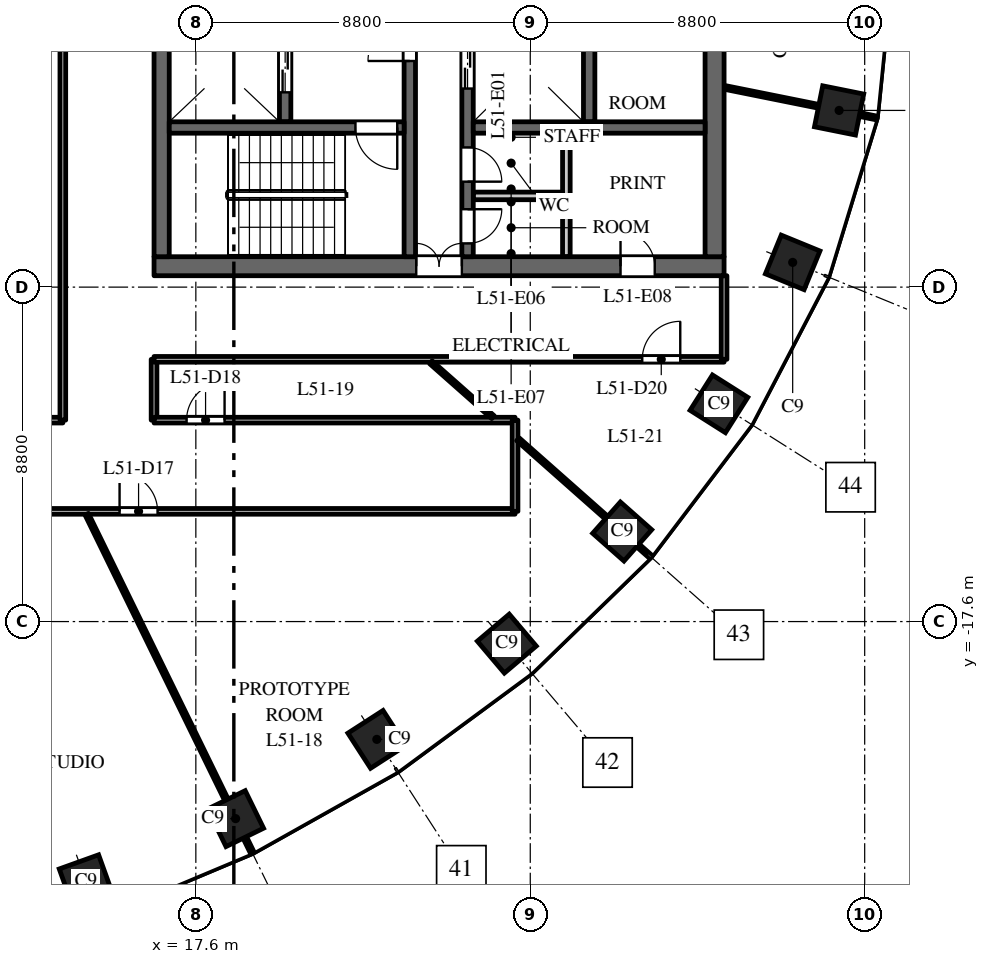
"""IFC4 building model, lengths in metres.
Left out: names, types, materials, properties, quantities, classifications, styles, units other than length and angle.
Written with IfcOpenShell. Run it as: python <this file> out.ifc"""

import sys

from ifc_helpers import new_model, si_unit, direction, frame, frame_2d, origin, origin_2d, place, context, subcontext, project, spatial, rectangle, extrude, element, fill, save


model = new_model("IFC4")
c1 = context("Model", 3, precision=1e-05, world=origin(), true_north=direction((0.0, 1.0)))
c2 = subcontext(c1, "Body", "Model", "MODEL_VIEW")
j1 = project(units=[si_unit("LENGTHUNIT", "METRE"), si_unit("PLANEANGLEUNIT", "RADIAN")], contexts=[c1])
p1 = place(None, origin())
s1 = spatial("IfcSite", under=j1, at=p1, CompositionType="ELEMENT")
p2 = place(p1, origin())
s2 = spatial("IfcBuilding", under=s1, at=p2, CompositionType="ELEMENT")
p3 = place(p2, frame((0.0, 0.0, 245.5)))
s3 = spatial("IfcBuildingStorey", under=s2, at=p3, CompositionType="ELEMENT", Elevation=245.5)
for number, where, z_axis, x_axis in (
    (1, (14.709, -24.441, 0.0), (0.0, 0.0, 1.0), (0.941, 0.338, 0.0)),
    (2, (18.646, -22.785, 0.0), (0.0, 0.0, 1.0), (0.898, 0.439, 0.0)),
    (3, (22.362, -20.7, 0.0), (0.0, 0.0, 1.0), (0.84, 0.542, 0.0)),
    (4, (25.783, -18.18, 0.0), (0.0, 0.0, 1.0), (0.763, 0.646, 0.0)),
    (5, (28.819, -15.23, 0.0), (0.0, 0.0, 1.0), (0.663, 0.749, 0.0)),
    (6, (31.365, -11.871, 0.0), (0.0, 0.0, 1.0), (0.535, 0.845, 0.0)),
    (7, (33.305, -8.149, 0.0), (0.0, 0.0, 1.0), (0.379, 0.925, 0.0)),
    (8, (34.527, -4.151, 0.0), (0.0, 0.0, 1.0), (0.197, 0.98, 0.0)),
):
    element("IfcColumn", number, at=place(p3, frame(where, z_axis=z_axis, x_axis=x_axis)), inside=s3, PredefinedType="COLUMN", context=c2, shape_type="SweptSolid", body=[
        extrude(rectangle(XDim=1.1, YDim=1.1, at=origin_2d()), origin(), (0.0, 0.0, 1.0), 4.0),
    ])
p4 = place(p3, frame((16.5, -8.25, 0.0), z_axis=(0.0, 0.0, 1.0), x_axis=(1.0, 0.0, 0.0)))
e9 = element("IfcWall", 9, at=p4, inside=s3, PredefinedType="SHEAR", context=c2, shape_type="SweptSolid", body=[
    extrude(rectangle(XDim=15.0, YDim=0.5, at=frame_2d((7.5, 0.0))), origin(), (0.0, 0.0, 1.0), 3.7),
])
p5 = place(p4, frame((6.9, 0.0, 0.0)))
e10 = element("IfcOpeningElement", 10, at=p5, cuts=e9, PredefinedType="OPENING", context=c2, shape_type="SweptSolid", body=[
    extrude(rectangle(XDim=1.2, YDim=2.1, at=frame_2d((0.6, 1.05))), frame((0.0, 0.26, 0.0), z_axis=(0.0, -1.0, 0.0), x_axis=(1.0, 0.0, 0.0)), (0.0, 0.0, 1.0), 0.52),
])
p6 = place(p4, frame((12.275, 0.0, 0.0)))
e11 = element("IfcOpeningElement", 11, at=p6, cuts=e9, PredefinedType="OPENING", context=c2, shape_type="SweptSolid", body=[
    extrude(rectangle(XDim=0.9, YDim=2.1, at=frame_2d((0.45, 1.05))), frame((0.0, 0.26, 0.0), z_axis=(0.0, -1.0, 0.0), x_axis=(1.0, 0.0, 0.0)), (0.0, 0.0, 1.0), 0.52),
])
p7 = place(p3, frame((27.95, -4.45, 0.0), z_axis=(0.0, 0.0, 1.0), x_axis=(0.0, 1.0, 0.0)))
e12 = element("IfcWall", 12, at=p7, inside=s3, PredefinedType="SHEAR", context=c2, shape_type="SweptSolid", body=[
    extrude(rectangle(XDim=8.9, YDim=0.3, at=frame_2d((4.45, 0.0))), origin(), (0.0, 0.0, 1.0), 3.7),
])
p8 = place(p3, frame((19.95, -4.45, 0.0), z_axis=(0.0, 0.0, 1.0), x_axis=(0.0, 1.0, 0.0)))
e13 = element("IfcWall", 13, at=p8, inside=s3, PredefinedType="SHEAR", context=c2, shape_type="SweptSolid", body=[
    extrude(rectangle(XDim=8.9, YDim=0.3, at=frame_2d((4.45, 0.0))), origin(), (0.0, 0.0, 1.0), 3.7),
])
p9 = place(p8, frame((0.775, 0.0, 0.0)))
e14 = element("IfcOpeningElement", 14, at=p9, cuts=e13, PredefinedType="OPENING", context=c2, shape_type="SweptSolid", body=[
    extrude(rectangle(XDim=1.2, YDim=2.1, at=frame_2d((0.6, 1.05))), frame((0.0, 0.16, 0.0), z_axis=(0.0, -1.0, 0.0), x_axis=(1.0, 0.0, 0.0)), (0.0, 0.0, 1.0), 0.32),
])
p10 = place(p8, frame((4.675, 0.0, 0.0)))
e15 = element("IfcOpeningElement", 15, at=p10, cuts=e13, PredefinedType="OPENING", context=c2, shape_type="SweptSolid", body=[
    extrude(rectangle(XDim=1.1, YDim=2.1, at=frame_2d((0.55, 1.05))), frame((0.0, 0.16, 0.0), z_axis=(0.0, -1.0, 0.0), x_axis=(1.0, 0.0, 0.0)), (0.0, 0.0, 1.0), 0.32),
])
p11 = place(p8, frame((7.25, 0.0, 0.0)))
e16 = element("IfcOpeningElement", 16, at=p11, cuts=e13, PredefinedType="OPENING", context=c2, shape_type="SweptSolid", body=[
    extrude(rectangle(XDim=1.1, YDim=2.1, at=frame_2d((0.55, 1.05))), frame((0.0, 0.16, 0.0), z_axis=(0.0, -1.0, 0.0), x_axis=(1.0, 0.0, 0.0)), (0.0, 0.0, 1.0), 0.32),
])
p12 = place(p3, frame((24.75, -8.0, 0.0), z_axis=(0.0, 0.0, 1.0), x_axis=(0.0, 1.0, 0.0)))
e17 = element("IfcWall", 17, at=p12, inside=s3, PredefinedType="SHEAR", context=c2, shape_type="SweptSolid", body=[
    extrude(rectangle(XDim=16.0, YDim=0.3, at=frame_2d((8.0, 0.0))), origin(), (0.0, 0.0, 1.0), 3.7),
])
p13 = place(p12, frame((4.425, 0.0, 0.0)))
e18 = element("IfcOpeningElement", 18, at=p13, cuts=e17, PredefinedType="OPENING", context=c2, shape_type="SweptSolid", body=[
    extrude(rectangle(XDim=1.1, YDim=2.1, at=frame_2d((0.55, 1.05))), frame((0.0, 0.16, 0.0), z_axis=(0.0, -1.0, 0.0), x_axis=(1.0, 0.0, 0.0)), (0.0, 0.0, 1.0), 0.32),
])
p14 = place(p12, frame((7.45, 0.0, 0.0)))
e19 = element("IfcOpeningElement", 19, at=p14, cuts=e17, PredefinedType="OPENING", context=c2, shape_type="SweptSolid", body=[
    extrude(rectangle(XDim=1.1, YDim=2.1, at=frame_2d((0.55, 1.05))), frame((0.0, 0.16, 0.0), z_axis=(0.0, -1.0, 0.0), x_axis=(1.0, 0.0, 0.0)), (0.0, 0.0, 1.0), 0.32),
])
p15 = place(p12, frame((10.475, 0.0, 0.0)))
e20 = element("IfcOpeningElement", 20, at=p15, cuts=e17, PredefinedType="OPENING", context=c2, shape_type="SweptSolid", body=[
    extrude(rectangle(XDim=1.1, YDim=2.1, at=frame_2d((0.55, 1.05))), frame((0.0, 0.16, 0.0), z_axis=(0.0, -1.0, 0.0), x_axis=(1.0, 0.0, 0.0)), (0.0, 0.0, 1.0), 0.32),
])
p16 = place(p12, frame((13.75, 0.0, 0.0)))
e21 = element("IfcOpeningElement", 21, at=p16, cuts=e17, PredefinedType="OPENING", context=c2, shape_type="SweptSolid", body=[
    extrude(rectangle(XDim=0.9, YDim=2.1, at=frame_2d((0.45, 1.05))), frame((0.0, 0.16, 0.0), z_axis=(0.0, -1.0, 0.0), x_axis=(1.0, 0.0, 0.0)), (0.0, 0.0, 1.0), 0.32),
])
p17 = place(p12, frame((1.975, 0.0, 0.0)))
e22 = element("IfcOpeningElement", 22, at=p17, cuts=e17, PredefinedType="OPENING", context=c2, shape_type="SweptSolid", body=[
    extrude(rectangle(XDim=0.9, YDim=2.1, at=frame_2d((0.45, 1.05))), frame((0.0, 0.16, 0.0), z_axis=(0.0, -1.0, 0.0), x_axis=(1.0, 0.0, 0.0)), (0.0, 0.0, 1.0), 0.32),
])
p18 = place(p12, frame((0.35, 0.0, 0.0)))
e23 = element("IfcOpeningElement", 23, at=p18, cuts=e17, PredefinedType="OPENING", context=c2, shape_type="SweptSolid", body=[
    extrude(rectangle(XDim=0.9, YDim=2.1, at=frame_2d((0.45, 1.05))), frame((0.0, 0.16, 0.0), z_axis=(0.0, -1.0, 0.0), x_axis=(1.0, 0.0, 0.0)), (0.0, 0.0, 1.0), 0.32),
])
p19 = place(p3, frame((16.7, -8.0, 0.0), z_axis=(0.0, 0.0, 1.0), x_axis=(0.0, 1.0, 0.0)))
e24 = element("IfcWall", 24, at=p19, inside=s3, PredefinedType="SHEAR", context=c2, shape_type="SweptSolid", body=[
    extrude(rectangle(XDim=16.0, YDim=0.4, at=frame_2d((8.0, 0.0))), origin(), (0.0, 0.0, 1.0), 3.7),
])
p20 = place(p3, frame((31.25, -8.0, 0.0), z_axis=(0.0, 0.0, 1.0), x_axis=(0.0, 1.0, 0.0)))
e25 = element("IfcWall", 25, at=p20, inside=s3, PredefinedType="SHEAR", context=c2, shape_type="SweptSolid", body=[
    extrude(rectangle(XDim=16.0, YDim=0.5, at=frame_2d((8.0, 0.0))), origin(), (0.0, 0.0, 1.0), 3.7),
])
p21 = place(p3, frame((27.35, -8.0, 0.0), z_axis=(0.0, 0.0, 1.0), x_axis=(0.0, 1.0, 0.0)))
e26 = element("IfcWall", 26, at=p21, inside=s3, PredefinedType="PARTITIONING", context=c2, shape_type="SweptSolid", body=[
    extrude(rectangle(XDim=3.25, YDim=0.2, at=frame_2d((1.625, 0.0))), origin(), (0.0, 0.0, 1.0), 3.7),
])
p22 = place(p3, frame((24.9, -6.4, 0.0), z_axis=(0.0, 0.0, 1.0), x_axis=(1.0, 0.0, 0.0)))
e27 = element("IfcWall", 27, at=p22, inside=s3, PredefinedType="PARTITIONING", context=c2, shape_type="SweptSolid", body=[
    extrude(rectangle(XDim=2.35, YDim=0.2, at=frame_2d((1.175, 0.0))), origin(), (0.0, 0.0, 1.0), 3.7),
])
p23 = place(p3, frame((24.9, -4.6, 0.0), z_axis=(0.0, 0.0, 1.0), x_axis=(1.0, 0.0, 0.0)))
e28 = element("IfcWall", 28, at=p23, inside=s3, PredefinedType="SHEAR", context=c2, shape_type="SweptSolid", body=[
    extrude(rectangle(XDim=6.1, YDim=0.3, at=frame_2d((3.05, 0.0))), origin(), (0.0, 0.0, 1.0), 3.7),
])
p24 = place(p3, frame((23.23, -8.0, 0.0), z_axis=(0.0, 0.0, 1.0), x_axis=(0.0, 1.0, 0.0)))
e29 = element("IfcWall", 29, at=p24, inside=s3, PredefinedType="SHEAR", context=c2, shape_type="SweptSolid", body=[
    extrude(rectangle(XDim=7.875, YDim=0.3, at=frame_2d((3.938, 0.0))), origin(), (0.0, 0.0, 1.0), 3.7),
])
p25 = place(p24, frame((5.15, 0.0, 0.0)))
e30 = element("IfcOpeningElement", 30, at=p25, cuts=e29, PredefinedType="OPENING", context=c2, shape_type="SweptSolid", body=[
    extrude(rectangle(XDim=1.1, YDim=2.1, at=frame_2d((0.55, 1.05))), frame((0.0, 0.16, 0.0), z_axis=(0.0, -1.0, 0.0), x_axis=(1.0, 0.0, 0.0)), (0.0, 0.0, 1.0), 0.32),
])
p26 = place(p3, frame((16.9, -4.6, 0.0), z_axis=(0.0, 0.0, 1.0), x_axis=(1.0, 0.0, 0.0)))
e31 = element("IfcWall", 31, at=p26, inside=s3, PredefinedType="SHEAR", context=c2, shape_type="SweptSolid", body=[
    extrude(rectangle(XDim=6.18, YDim=0.3, at=frame_2d((3.09, 0.0))), origin(), (0.0, 0.0, 1.0), 3.7),
])
p27 = place(p26, frame((4.9, 0.0, 0.0)))
e32 = element("IfcOpeningElement", 32, at=p27, cuts=e31, PredefinedType="OPENING", context=c2, shape_type="SweptSolid", body=[
    extrude(rectangle(XDim=1.1, YDim=2.1, at=frame_2d((0.55, 1.05))), frame((0.0, 0.16, 0.0), z_axis=(0.0, -1.0, 0.0), x_axis=(1.0, 0.0, 0.0)), (0.0, 0.0, 1.0), 0.32),
])
p28 = place(p3, frame((-14.1, -12.3, 0.0), z_axis=(0.0, 0.0, 1.0), x_axis=(1.0, 0.0, 0.0)))
e33 = element("IfcWall", 33, at=p28, inside=s3, PredefinedType="PARTITIONING", context=c2, shape_type="SweptSolid", body=[
    extrude(rectangle(XDim=28.2, YDim=0.15, at=frame_2d((14.1, 0.0))), origin(), (0.0, 0.0, 1.0), 2.85),
])
p29 = place(p28, frame((10.42, 0.0, 0.0)))
e34 = element("IfcOpeningElement", 34, at=p29, cuts=e33, PredefinedType="OPENING", context=c2, shape_type="SweptSolid", body=[
    extrude(rectangle(XDim=1.0, YDim=2.1, at=frame_2d((0.5, 1.05))), frame((0.0, 0.085, 0.0), z_axis=(0.0, -1.0, 0.0), x_axis=(1.0, 0.0, 0.0)), (0.0, 0.0, 1.0), 0.17),
])
p30 = place(p28, frame((15.12, 0.0, 0.0)))
e35 = element("IfcOpeningElement", 35, at=p30, cuts=e33, PredefinedType="OPENING", context=c2, shape_type="SweptSolid", body=[
    extrude(rectangle(XDim=1.0, YDim=2.1, at=frame_2d((0.5, 1.05))), frame((0.0, 0.085, 0.0), z_axis=(0.0, -1.0, 0.0), x_axis=(1.0, 0.0, 0.0)), (0.0, 0.0, 1.0), 0.17),
])
p31 = place(p3, frame((0.641, -14.7, 0.0), z_axis=(0.0, 0.0, 1.0), x_axis=(1.0, 0.0, 0.0)))
e36 = element("IfcWall", 36, at=p31, inside=s3, PredefinedType="PARTITIONING", context=c2, shape_type="SweptSolid", body=[
    extrude(rectangle(XDim=25.359, YDim=0.15, at=frame_2d((12.679, 0.0))), origin(), (0.0, 0.0, 1.0), 2.85),
])
p32 = place(p31, frame((0.65, 0.0, 0.0)))
e37 = element("IfcOpeningElement", 37, at=p32, cuts=e36, PredefinedType="OPENING", context=c2, shape_type="SweptSolid", body=[
    extrude(rectangle(XDim=1.0, YDim=2.1, at=frame_2d((0.5, 1.05))), frame((0.0, 0.085, 0.0), z_axis=(0.0, -1.0, 0.0), x_axis=(1.0, 0.0, 0.0)), (0.0, 0.0, 1.0), 0.17),
])
p33 = place(p31, frame((14.952, 0.0, 0.0)))
e38 = element("IfcOpeningElement", 38, at=p33, cuts=e36, PredefinedType="OPENING", context=c2, shape_type="SweptSolid", body=[
    extrude(rectangle(XDim=1.0, YDim=2.1, at=frame_2d((0.5, 1.05))), frame((0.0, 0.085, 0.0), z_axis=(0.0, -1.0, 0.0), x_axis=(1.0, 0.0, 0.0)), (0.0, 0.0, 1.0), 0.17),
])
p34 = place(p3, frame((14.1, -12.3, 0.0), z_axis=(0.0, 0.0, 1.0), x_axis=(0.0, 1.0, 0.0)))
e39 = element("IfcWall", 39, at=p34, inside=s3, PredefinedType="PARTITIONING", context=c2, shape_type="SweptSolid", body=[
    extrude(rectangle(XDim=24.6, YDim=0.15, at=frame_2d((12.3, 0.0))), origin(), (0.0, 0.0, 1.0), 2.75),
])
p35 = place(p34, frame((22.95, 0.0, 0.0)))
e40 = element("IfcOpeningElement", 40, at=p35, cuts=e39, PredefinedType="OPENING", context=c2, shape_type="SweptSolid", body=[
    extrude(rectangle(XDim=1.0, YDim=2.1, at=frame_2d((0.5, 1.05))), frame((0.0, 0.085, 0.0), z_axis=(0.0, -1.0, 0.0), x_axis=(1.0, 0.0, 0.0)), (0.0, 0.0, 1.0), 0.17),
])
p36 = place(p3, frame((14.73, -14.775, 0.0), z_axis=(0.0, 0.0, 1.0), x_axis=(0.439200418971, -0.898389109448, 0.0)))
e41 = element("IfcWall", 41, at=p36, inside=s3, PredefinedType="PARTITIONING", context=c2, shape_type="SweptSolid", body=[
    extrude(rectangle(XDim=9.918, YDim=0.1, at=frame_2d((4.959, 0.0))), origin(), (0.0, 0.0, 1.0), 3.0),
])
p37 = place(p3, frame((16.5, -12.3, 0.0), z_axis=(0.0, 0.0, 1.0), x_axis=(0.0, 1.0, 0.0)))
e42 = element("IfcWall", 42, at=p37, inside=s3, PredefinedType="PARTITIONING", context=c2, shape_type="SweptSolid", body=[
    extrude(rectangle(XDim=1.6, YDim=0.15, at=frame_2d((0.8, 0.0))), origin(), (0.0, 0.0, 1.0), 3.7),
])
p38 = place(p3, frame((16.5, -12.3, 0.0), z_axis=(0.0, 0.0, 1.0), x_axis=(1.0, 0.0, 0.0)))
e43 = element("IfcWall", 43, at=p38, inside=s3, PredefinedType="PARTITIONING", context=c2, shape_type="SweptSolid", body=[
    extrude(rectangle(XDim=9.5, YDim=0.15, at=frame_2d((4.75, 0.0))), origin(), (0.0, 0.0, 1.0), 2.75),
])
p39 = place(p38, frame((0.856, 0.0, 0.0)))
e44 = element("IfcOpeningElement", 44, at=p39, cuts=e43, PredefinedType="OPENING", context=c2, shape_type="SweptSolid", body=[
    extrude(rectangle(XDim=1.0, YDim=2.1, at=frame_2d((0.5, 1.05))), frame((0.0, 0.085, 0.0), z_axis=(0.0, -1.0, 0.0), x_axis=(1.0, 0.0, 0.0)), (0.0, 0.0, 1.0), 0.17),
])
p40 = place(p3, frame((16.5, -10.7, 0.0), z_axis=(0.0, 0.0, 1.0), x_axis=(1.0, 0.0, 0.0)))
e45 = element("IfcWall", 45, at=p40, inside=s3, PredefinedType="PARTITIONING", context=c2, shape_type="SweptSolid", body=[
    extrude(rectangle(XDim=15.0, YDim=0.15, at=frame_2d((7.5, 0.0))), origin(), (0.0, 0.0, 1.0), 2.75),
])
p41 = place(p40, frame((12.847, 0.0, 0.0)))
e46 = element("IfcOpeningElement", 46, at=p41, cuts=e45, PredefinedType="OPENING", context=c2, shape_type="SweptSolid", body=[
    extrude(rectangle(XDim=1.0, YDim=2.1, at=frame_2d((0.5, 1.05))), frame((0.0, 0.085, 0.0), z_axis=(0.0, -1.0, 0.0), x_axis=(1.0, 0.0, 0.0)), (0.0, 0.0, 1.0), 0.17),
])
p42 = place(p3, frame((23.785, -10.778, 0.0), z_axis=(0.0, 0.0, 1.0), x_axis=(0.749173971072, -0.662373279253, 0.0)))
e47 = element("IfcWall", 47, at=p42, inside=s3, PredefinedType="PARTITIONING", context=c2, shape_type="SweptSolid", body=[
    extrude(rectangle(XDim=2.18, YDim=0.1, at=frame_2d((1.09, 0.0))), origin(), (0.0, 0.0, 1.0), 3.7),
])
p43 = place(p3, frame((26.0, -14.7, 0.0), z_axis=(0.0, 0.0, 1.0), x_axis=(0.0, 1.0, 0.0)))
e48 = element("IfcWall", 48, at=p43, inside=s3, PredefinedType="PARTITIONING", context=c2, shape_type="SweptSolid", body=[
    extrude(rectangle(XDim=2.4, YDim=0.15, at=frame_2d((1.2, 0.0))), origin(), (0.0, 0.0, 1.0), 2.75),
])
p44 = place(p3, frame((26.075, -12.803, 0.0), z_axis=(0.0, 0.0, 1.0), x_axis=(0.748882694597, -0.662702580147, 0.0)))
e49 = element("IfcWall", 49, at=p44, inside=s3, PredefinedType="PARTITIONING", context=c2, shape_type="SweptSolid", body=[
    extrude(rectangle(XDim=4.666, YDim=0.1, at=frame_2d((2.333, 0.0))), origin(), (0.0, 0.0, 1.0), 2.75),
])
p45 = place(p3, frame((31.5, -10.7, 0.0), z_axis=(0.0, 0.0, 1.0), x_axis=(0.0, 1.0, 0.0)))
e50 = element("IfcWall", 50, at=p45, inside=s3, PredefinedType="PARTITIONING", context=c2, shape_type="SweptSolid", body=[
    extrude(rectangle(XDim=2.2, YDim=0.15, at=frame_2d((1.1, 0.0))), origin(), (0.0, 0.0, 1.0), 3.0),
])
p46 = place(p3, frame((31.5, -3.542, 0.0), z_axis=(0.0, 0.0, 1.0), x_axis=(0.980357474535, -0.197228857227, 0.0)))
e51 = element("IfcWall", 51, at=p46, inside=s3, PredefinedType="PARTITIONING", context=c2, shape_type="SweptSolid", body=[
    extrude(rectangle(XDim=4.092, YDim=0.1, at=frame_2d((2.046, 0.0))), origin(), (0.0, 0.0, 1.0), 3.0),
])
p47 = place(p9, origin())
e52 = element("IfcDoor", 52, at=p47, inside=s3, OperationType="DOUBLE_DOOR_SLIDING", PredefinedType="DOOR", context=c2, shape_type="SweptSolid", body=[
    extrude(rectangle(XDim=1.2, YDim=2.1, at=frame_2d((0.6, 1.05))), frame((0.0, 0.025, 0.0), z_axis=(0.0, -1.0, 0.0), x_axis=(1.0, 0.0, 0.0)), (0.0, 0.0, 1.0), 0.05),
])
fill(e14, e52)
p48 = place(p13, origin())
e53 = element("IfcDoor", 53, at=p48, inside=s3, OperationType="DOUBLE_DOOR_SLIDING", PredefinedType="DOOR", context=c2, shape_type="SweptSolid", body=[
    extrude(rectangle(XDim=1.1, YDim=2.1, at=frame_2d((0.55, 1.05))), frame((0.0, 0.025, 0.0), z_axis=(0.0, -1.0, 0.0), x_axis=(1.0, 0.0, 0.0)), (0.0, 0.0, 1.0), 0.05),
])
fill(e18, e53)
p49 = place(p27, origin())
e54 = element("IfcDoor", 54, at=p49, inside=s3, OperationType="SINGLE_SWING_RIGHT", PredefinedType="DOOR", context=c2, shape_type="SweptSolid", body=[
    extrude(rectangle(XDim=1.1, YDim=2.1, at=frame_2d((0.55, 1.05))), frame((0.0, 0.025, 0.0), z_axis=(0.0, -1.0, 0.0), x_axis=(1.0, 0.0, 0.0)), (0.0, 0.0, 1.0), 0.05),
])
fill(e32, e54)
p50 = place(p25, origin())
e55 = element("IfcDoor", 55, at=p50, inside=s3, OperationType="SINGLE_SWING_RIGHT", PredefinedType="DOOR", context=c2, shape_type="SweptSolid", body=[
    extrude(rectangle(XDim=1.1, YDim=2.1, at=frame_2d((0.55, 1.05))), frame((0.0, 0.025, 0.0), z_axis=(0.0, -1.0, 0.0), x_axis=(1.0, 0.0, 0.0)), (0.0, 0.0, 1.0), 0.05),
])
fill(e30, e55)
p51 = place(p5, origin())
e56 = element("IfcDoor", 56, at=p51, inside=s3, OperationType="DOUBLE_DOOR_DOUBLE_SWING", PredefinedType="DOOR", context=c2, shape_type="SweptSolid", body=[
    extrude(rectangle(XDim=1.2, YDim=2.1, at=frame_2d((0.6, 1.05))), frame((0.0, 0.025, 0.0), z_axis=(0.0, -1.0, 0.0), x_axis=(1.0, 0.0, 0.0)), (0.0, 0.0, 1.0), 0.05),
])
fill(e10, e56)
p52 = place(p17, origin())
e57 = element("IfcDoor", 57, at=p52, inside=s3, OperationType="SINGLE_SWING_LEFT", PredefinedType="DOOR", context=c2, shape_type="SweptSolid", body=[
    extrude(rectangle(XDim=0.9, YDim=2.1, at=frame_2d((0.45, 1.05))), frame((0.0, 0.025, 0.0), z_axis=(0.0, -1.0, 0.0), x_axis=(1.0, 0.0, 0.0)), (0.0, 0.0, 1.0), 0.05),
])
fill(e22, e57)
p53 = place(p18, origin())
e58 = element("IfcDoor", 58, at=p53, inside=s3, OperationType="SINGLE_SWING_RIGHT", PredefinedType="DOOR", context=c2, shape_type="SweptSolid", body=[
    extrude(rectangle(XDim=0.9, YDim=2.1, at=frame_2d((0.45, 1.05))), frame((0.0, 0.025, 0.0), z_axis=(0.0, -1.0, 0.0), x_axis=(1.0, 0.0, 0.0)), (0.0, 0.0, 1.0), 0.05),
])
fill(e23, e58)
p54 = place(p6, origin())
e59 = element("IfcDoor", 59, at=p54, inside=s3, OperationType="SINGLE_SWING_RIGHT", PredefinedType="DOOR", context=c2, shape_type="SweptSolid", body=[
    extrude(rectangle(XDim=0.9, YDim=2.1, at=frame_2d((0.45, 1.05))), frame((0.0, 0.025, 0.0), z_axis=(0.0, -1.0, 0.0), x_axis=(1.0, 0.0, 0.0)), (0.0, 0.0, 1.0), 0.05),
])
fill(e11, e59)
p55 = place(p33, origin())
e60 = element("IfcDoor", 60, at=p55, inside=s3, OperationType="SINGLE_SWING_LEFT", PredefinedType="DOOR", context=c2, shape_type="SweptSolid", body=[
    extrude(rectangle(XDim=1.0, YDim=2.1, at=frame_2d((0.5, 1.05))), frame((0.0, 0.025, 0.0), z_axis=(0.0, -1.0, 0.0), x_axis=(1.0, 0.0, 0.0)), (0.0, 0.0, 1.0), 0.05),
])
fill(e38, e60)
p56 = place(p39, origin())
e61 = element("IfcDoor", 61, at=p56, inside=s3, OperationType="SINGLE_SWING_RIGHT", PredefinedType="DOOR", context=c2, shape_type="SweptSolid", body=[
    extrude(rectangle(XDim=1.0, YDim=2.1, at=frame_2d((0.5, 1.05))), frame((0.0, 0.025, 0.0), z_axis=(0.0, -1.0, 0.0), x_axis=(1.0, 0.0, 0.0)), (0.0, 0.0, 1.0), 0.05),
])
fill(e44, e61)
p57 = place(p41, origin())
e62 = element("IfcDoor", 62, at=p57, inside=s3, OperationType="SINGLE_SWING_RIGHT", PredefinedType="DOOR", context=c2, shape_type="SweptSolid", body=[
    extrude(rectangle(XDim=1.0, YDim=2.1, at=frame_2d((0.5, 1.05))), frame((0.0, 0.025, 0.0), z_axis=(0.0, -1.0, 0.0), x_axis=(1.0, 0.0, 0.0)), (0.0, 0.0, 1.0), 0.05),
])
fill(e46, e62)
save(model, sys.argv[1])
